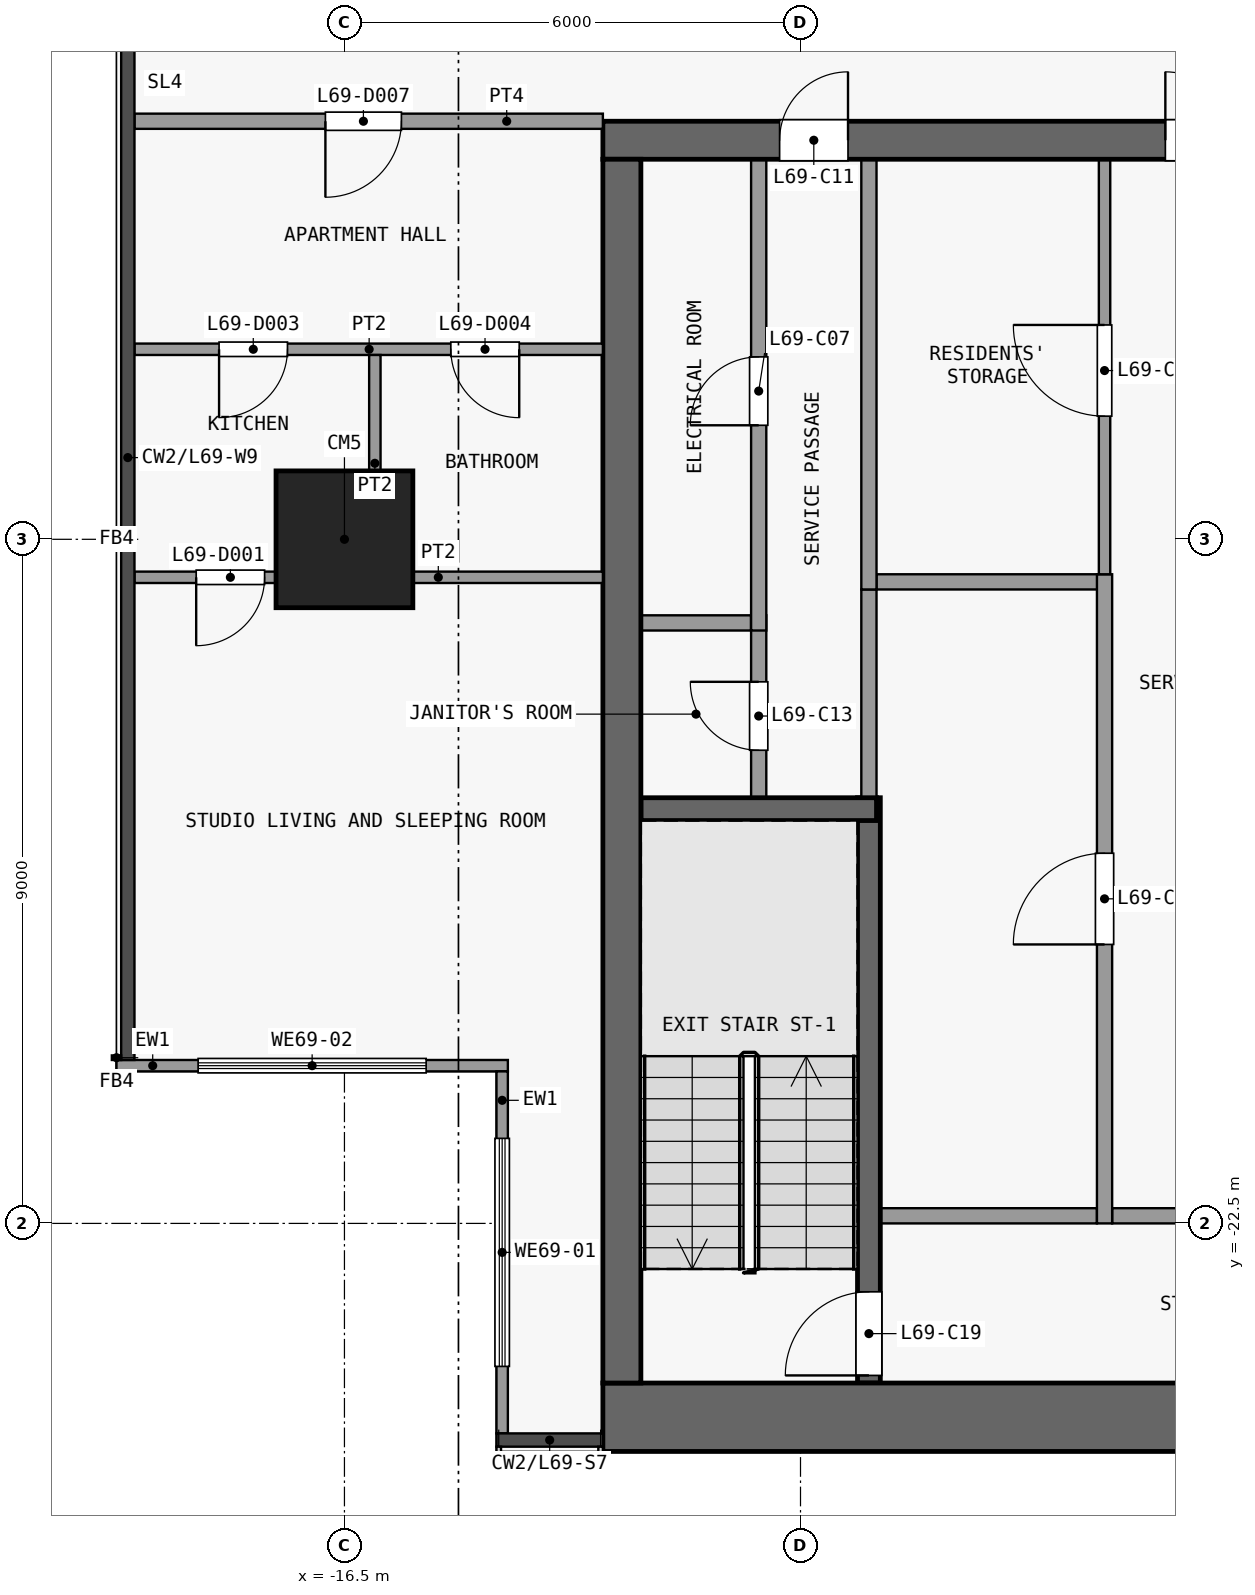
"""IFC4 building model, lengths in metres.
Left out: names, types, materials, properties, quantities, classifications, styles, units other than length and angle.
Written with IfcOpenShell. Run it as: python <this file> out.ifc"""

import sys

from ifc_helpers import new_model, si_unit, direction, frame, frame_2d, origin, origin_2d, place, context, subcontext, project, spatial, rectangle, extrude, element, fill, save


model = new_model("IFC4")
c1 = context("Model", 3, precision=1e-05, world=origin(), true_north=direction((0.0, 1.0)))
c2 = subcontext(c1, "Body", "Model", "MODEL_VIEW")
j1 = project(units=[si_unit("LENGTHUNIT", "METRE"), si_unit("PLANEANGLEUNIT", "RADIAN")], contexts=[c1])
p1 = place(None, origin())
s1 = spatial("IfcSite", under=j1, at=p1, CompositionType="ELEMENT")
p2 = place(p1, origin())
s2 = spatial("IfcBuilding", under=s1, at=p2, CompositionType="ELEMENT")
p3 = place(p2, frame((0.0, 0.0, 273.5)))
s3 = spatial("IfcBuildingStorey", under=s2, at=p3, CompositionType="ELEMENT", Elevation=273.5)
p4 = place(p3, frame((-16.5, -13.5, 0.0), z_axis=(0.0, 0.0, 1.0), x_axis=(1.0, 0.0, 0.0)))
e1 = element("IfcColumn", 1, at=p4, inside=s3, PredefinedType="COLUMN", context=c2, shape_type="SweptSolid", body=[
    extrude(rectangle(XDim=1.8, YDim=1.8, at=origin_2d()), origin(), (0.0, 0.0, 1.0), 3.6),
])
p5 = place(p3, frame((-13.1, -25.05, 0.0), z_axis=(0.0, 0.0, 1.0), x_axis=(1.0, 0.0, 0.0)))
e2 = element("IfcWall", 2, at=p5, inside=s3, PredefinedType="SHEAR", context=c2, shape_type="SweptSolid", body=[
    extrude(rectangle(XDim=26.2, YDim=0.9, at=frame_2d((13.1, 0.0))), origin(), (0.0, 0.0, 1.0), 3.3),
])
p6 = place(p3, frame((-13.1, -8.25, 0.0), z_axis=(0.0, 0.0, 1.0), x_axis=(1.0, 0.0, 0.0)))
e3 = element("IfcWall", 3, at=p6, inside=s3, PredefinedType="SHEAR", context=c2, shape_type="SweptSolid", body=[
    extrude(rectangle(XDim=26.2, YDim=0.5, at=frame_2d((13.1, 0.0))), origin(), (0.0, 0.0, 1.0), 3.3),
])
p7 = place(p6, frame((7.4, 0.0, 0.0)))
e4 = element("IfcOpeningElement", 4, at=p7, cuts=e3, PredefinedType="OPENING", context=c2, shape_type="SweptSolid", body=[
    extrude(rectangle(XDim=1.8, YDim=2.1, at=frame_2d((0.9, 1.05))), frame((0.0, 0.26, 0.0), z_axis=(0.0, -1.0, 0.0), x_axis=(1.0, 0.0, 0.0)), (0.0, 0.0, 1.0), 0.52),
])
p8 = place(p6, frame((17.0, 0.0, 0.0)))
e5 = element("IfcOpeningElement", 5, at=p8, cuts=e3, PredefinedType="OPENING", context=c2, shape_type="SweptSolid", body=[
    extrude(rectangle(XDim=1.8, YDim=2.1, at=frame_2d((0.9, 1.05))), frame((0.0, 0.26, 0.0), z_axis=(0.0, -1.0, 0.0), x_axis=(1.0, 0.0, 0.0)), (0.0, 0.0, 1.0), 0.52),
])
p9 = place(p6, frame((2.325, 0.0, 0.0)))
e6 = element("IfcOpeningElement", 6, at=p9, cuts=e3, PredefinedType="OPENING", context=c2, shape_type="SweptSolid", body=[
    extrude(rectangle(XDim=0.9, YDim=2.1, at=frame_2d((0.45, 1.05))), frame((0.0, 0.26, 0.0), z_axis=(0.0, -1.0, 0.0), x_axis=(1.0, 0.0, 0.0)), (0.0, 0.0, 1.0), 0.52),
])
p10 = place(p6, frame((22.975, 0.0, 0.0)))
e7 = element("IfcOpeningElement", 7, at=p10, cuts=e3, PredefinedType="OPENING", context=c2, shape_type="SweptSolid", body=[
    extrude(rectangle(XDim=0.9, YDim=2.1, at=frame_2d((0.45, 1.05))), frame((0.0, 0.26, 0.0), z_axis=(0.0, -1.0, 0.0), x_axis=(1.0, 0.0, 0.0)), (0.0, 0.0, 1.0), 0.52),
])
p11 = place(p3, frame((-12.85, -24.6, 0.0), z_axis=(0.0, 0.0, 1.0), x_axis=(0.0, 1.0, 0.0)))
e8 = element("IfcWall", 8, at=p11, inside=s3, PredefinedType="SHEAR", context=c2, shape_type="SweptSolid", body=[
    extrude(rectangle(XDim=16.1, YDim=0.5, at=frame_2d((8.05, 0.0))), origin(), (0.0, 0.0, 1.0), 3.3),
])
p12 = place(p3, frame((-9.45, -22.4, 0.0), z_axis=(0.0, 0.0, 1.0), x_axis=(1.0, 0.0, 0.0)))
e9 = element("IfcWall", 9, at=p12, inside=s3, PredefinedType="PARTITIONING", context=c2, shape_type="SweptSolid", body=[
    extrude(rectangle(XDim=2.85, YDim=0.2, at=frame_2d((1.425, 0.0))), origin(), (0.0, 0.0, 1.0), 3.3),
])
p13 = place(p3, frame((-3.25, -22.4, 0.0), z_axis=(0.0, 0.0, 1.0), x_axis=(-1.0, 0.0, 0.0)))
e10 = element("IfcWall", 10, at=p13, inside=s3, PredefinedType="PARTITIONING", context=c2, shape_type="SweptSolid", body=[
    extrude(rectangle(XDim=3.15, YDim=0.2, at=frame_2d((1.575, 0.0))), origin(), (0.0, 0.0, 1.0), 3.3),
])
p14 = place(p13, frame((0.8, 0.0, 0.0)))
e11 = element("IfcOpeningElement", 11, at=p14, cuts=e10, PredefinedType="OPENING", context=c2, shape_type="SweptSolid", body=[
    extrude(rectangle(XDim=1.5, YDim=2.1, at=frame_2d((0.75, 1.05))), frame((0.0, 0.11, 0.0), z_axis=(0.0, -1.0, 0.0), x_axis=(1.0, 0.0, 0.0)), (0.0, 0.0, 1.0), 0.22),
])
p15 = place(p3, frame((-12.6, -17.05, 0.0), z_axis=(0.0, 0.0, 1.0), x_axis=(1.0, 0.0, 0.0)))
e12 = element("IfcWall", 12, at=p15, inside=s3, PredefinedType="SHEAR", context=c2, shape_type="SweptSolid", body=[
    extrude(rectangle(XDim=3.1, YDim=0.3, at=frame_2d((1.55, 0.0))), origin(), (0.0, 0.0, 1.0), 3.3),
])
p16 = place(p3, frame((-12.6, -14.6, 0.0), z_axis=(0.0, 0.0, 1.0), x_axis=(1.0, 0.0, 0.0)))
e13 = element("IfcWall", 13, at=p16, inside=s3, PredefinedType="PARTITIONING", context=c2, shape_type="SweptSolid", body=[
    extrude(rectangle(XDim=1.45, YDim=0.2, at=frame_2d((0.725, 0.0))), origin(), (0.0, 0.0, 1.0), 3.3),
])
p17 = place(p3, frame((-9.5, -14.06, 0.0), z_axis=(0.0, 0.0, 1.0), x_axis=(1.0, 0.0, 0.0)))
e14 = element("IfcWall", 14, at=p17, inside=s3, PredefinedType="PARTITIONING", context=c2, shape_type="SweptSolid", body=[
    extrude(rectangle(XDim=3.075, YDim=0.2, at=frame_2d((1.538, 0.0))), origin(), (0.0, 0.0, 1.0), 3.3),
])
p18 = place(p3, frame((-11.05, -16.9, 0.0), z_axis=(0.0, 0.0, 1.0), x_axis=(0.0, 1.0, 0.0)))
e15 = element("IfcWall", 15, at=p18, inside=s3, PredefinedType="PARTITIONING", context=c2, shape_type="SweptSolid", body=[
    extrude(rectangle(XDim=2.4, YDim=0.2, at=frame_2d((1.2, 0.0))), origin(), (0.0, 0.0, 1.0), 3.3),
])
p19 = place(p18, frame((0.625, 0.0, 0.0)))
e16 = element("IfcOpeningElement", 16, at=p19, cuts=e15, PredefinedType="OPENING", context=c2, shape_type="SweptSolid", body=[
    extrude(rectangle(XDim=0.9, YDim=2.1, at=frame_2d((0.45, 1.05))), frame((0.0, 0.11, 0.0), z_axis=(0.0, -1.0, 0.0), x_axis=(1.0, 0.0, 0.0)), (0.0, 0.0, 1.0), 0.22),
])
p20 = place(p3, frame((-11.05, -14.7, 0.0), z_axis=(0.0, 0.0, 1.0), x_axis=(0.0, 1.0, 0.0)))
e17 = element("IfcWall", 17, at=p20, inside=s3, PredefinedType="PARTITIONING", context=c2, shape_type="SweptSolid", body=[
    extrude(rectangle(XDim=6.2, YDim=0.2, at=frame_2d((3.1, 0.0))), origin(), (0.0, 0.0, 1.0), 3.3),
])
p21 = place(p20, frame((2.7, 0.0, 0.0)))
e18 = element("IfcOpeningElement", 18, at=p21, cuts=e17, PredefinedType="OPENING", context=c2, shape_type="SweptSolid", body=[
    extrude(rectangle(XDim=0.9, YDim=2.1, at=frame_2d((0.45, 1.05))), frame((0.0, 0.11, 0.0), z_axis=(0.0, -1.0, 0.0), x_axis=(1.0, 0.0, 0.0)), (0.0, 0.0, 1.0), 0.22),
])
p22 = place(p3, frame((-9.6, -24.6, 0.0), z_axis=(0.0, 0.0, 1.0), x_axis=(0.0, 1.0, 0.0)))
e19 = element("IfcWall", 19, at=p22, inside=s3, PredefinedType="SHEAR", context=c2, shape_type="SweptSolid", body=[
    extrude(rectangle(XDim=7.7, YDim=0.3, at=frame_2d((3.85, 0.0))), origin(), (0.0, 0.0, 1.0), 3.3),
])
p23 = place(p22, frame((0.1, 0.0, 0.0)))
e20 = element("IfcOpeningElement", 20, at=p23, cuts=e19, PredefinedType="OPENING", context=c2, shape_type="SweptSolid", body=[
    extrude(rectangle(XDim=1.1, YDim=2.1, at=frame_2d((0.55, 1.05))), frame((0.0, 0.16, 0.0), z_axis=(0.0, -1.0, 0.0), x_axis=(1.0, 0.0, 0.0)), (0.0, 0.0, 1.0), 0.32),
])
p24 = place(p3, frame((-9.6, -16.9, 0.0), z_axis=(0.0, 0.0, 1.0), x_axis=(0.0, 1.0, 0.0)))
e21 = element("IfcWall", 21, at=p24, inside=s3, PredefinedType="PARTITIONING", context=c2, shape_type="SweptSolid", body=[
    extrude(rectangle(XDim=2.74, YDim=0.2, at=frame_2d((1.37, 0.0))), origin(), (0.0, 0.0, 1.0), 3.3),
])
p25 = place(p3, frame((-9.6, -14.16, 0.0), z_axis=(0.0, 0.0, 1.0), x_axis=(0.0, 1.0, 0.0)))
e22 = element("IfcWall", 22, at=p25, inside=s3, PredefinedType="PARTITIONING", context=c2, shape_type="SweptSolid", body=[
    extrude(rectangle(XDim=5.66, YDim=0.2, at=frame_2d((2.83, 0.0))), origin(), (0.0, 0.0, 1.0), 3.3),
])
p26 = place(p3, frame((-6.5, -22.5, 0.0), z_axis=(0.0, 0.0, 1.0), x_axis=(0.0, 1.0, 0.0)))
e23 = element("IfcWall", 23, at=p26, inside=s3, PredefinedType="PARTITIONING", context=c2, shape_type="SweptSolid", body=[
    extrude(rectangle(XDim=8.54, YDim=0.2, at=frame_2d((4.27, 0.0))), origin(), (0.0, 0.0, 1.0), 3.3),
])
p27 = place(p26, frame((3.67, 0.0, 0.0)))
e24 = element("IfcOpeningElement", 24, at=p27, cuts=e23, PredefinedType="OPENING", context=c2, shape_type="SweptSolid", body=[
    extrude(rectangle(XDim=1.2, YDim=2.1, at=frame_2d((0.6, 1.05))), frame((0.0, 0.11, 0.0), z_axis=(0.0, -1.0, 0.0), x_axis=(1.0, 0.0, 0.0)), (0.0, 0.0, 1.0), 0.22),
])
p28 = place(p3, frame((-6.5, -13.96, 0.0), z_axis=(0.0, 0.0, 1.0), x_axis=(0.0, 1.0, 0.0)))
e25 = element("IfcWall", 25, at=p28, inside=s3, PredefinedType="PARTITIONING", context=c2, shape_type="SweptSolid", body=[
    extrude(rectangle(XDim=5.46, YDim=0.15, at=frame_2d((2.73, 0.0))), origin(), (0.0, 0.0, 1.0), 3.3),
])
p29 = place(p28, frame((2.08, 0.0, 0.0)))
e26 = element("IfcOpeningElement", 26, at=p29, cuts=e25, PredefinedType="OPENING", context=c2, shape_type="SweptSolid", body=[
    extrude(rectangle(XDim=1.2, YDim=2.1, at=frame_2d((0.6, 1.05))), frame((0.0, 0.085, 0.0), z_axis=(0.0, -1.0, 0.0), x_axis=(1.0, 0.0, 0.0)), (0.0, 0.0, 1.0), 0.17),
])
p30 = place(p3, frame((-14.425, -25.262, 0.0), z_axis=(0.0, 0.0, 1.0), x_axis=(0.0, 1.0, 0.0)))
e27 = element("IfcWall", 27, at=p30, inside=s3, PredefinedType="SOLIDWALL", context=c2, shape_type="SweptSolid", body=[
    extrude(rectangle(XDim=4.762, YDim=0.15, at=frame_2d((2.381, 0.0))), origin(), (0.0, 0.0, 1.0), 3.3),
])
p31 = place(p30, frame((0.881, 0.0, 0.9)))
e28 = element("IfcOpeningElement", 28, at=p31, cuts=e27, PredefinedType="OPENING", context=c2, shape_type="SweptSolid", body=[
    extrude(rectangle(XDim=3.0, YDim=2.4, at=frame_2d((1.5, 1.2))), frame((0.0, 0.085, 0.0), z_axis=(0.0, -1.0, 0.0), x_axis=(1.0, 0.0, 0.0)), (0.0, 0.0, 1.0), 0.17),
])
p32 = place(p3, frame((-14.35, -20.425, 0.0), z_axis=(0.0, 0.0, 1.0), x_axis=(-1.0, 0.0, 0.0)))
e29 = element("IfcWall", 29, at=p32, inside=s3, PredefinedType="SOLIDWALL", context=c2, shape_type="SweptSolid", body=[
    extrude(rectangle(XDim=5.15, YDim=0.15, at=frame_2d((2.575, 0.0))), origin(), (0.0, 0.0, 1.0), 3.3),
])
p33 = place(p32, frame((1.075, 0.0, 0.9)))
e30 = element("IfcOpeningElement", 30, at=p33, cuts=e29, PredefinedType="OPENING", context=c2, shape_type="SweptSolid", body=[
    extrude(rectangle(XDim=3.0, YDim=2.4, at=frame_2d((1.5, 1.2))), frame((0.0, 0.085, 0.0), z_axis=(0.0, -1.0, 0.0), x_axis=(1.0, 0.0, 0.0)), (0.0, 0.0, 1.0), 0.17),
])
p34 = place(p3, frame((-19.262, -14.0, 0.0), z_axis=(0.0, 0.0, 1.0), x_axis=(1.0, 0.0, 0.0)))
e31 = element("IfcWall", 31, at=p34, inside=s3, PredefinedType="PARTITIONING", context=c2, shape_type="SweptSolid", body=[
    extrude(rectangle(XDim=6.162, YDim=0.15, at=frame_2d((3.081, 0.0))), origin(), (0.0, 0.0, 1.0), 3.3),
])
p35 = place(p34, frame((0.812, 0.0, 0.0)))
e32 = element("IfcOpeningElement", 32, at=p35, cuts=e31, PredefinedType="OPENING", context=c2, shape_type="SweptSolid", body=[
    extrude(rectangle(XDim=0.9, YDim=2.1, at=frame_2d((0.45, 1.05))), frame((0.0, 0.085, 0.0), z_axis=(0.0, -1.0, 0.0), x_axis=(1.0, 0.0, 0.0)), (0.0, 0.0, 1.0), 0.17),
])
p36 = place(p3, frame((-19.262, -11.0, 0.0), z_axis=(0.0, 0.0, 1.0), x_axis=(1.0, 0.0, 0.0)))
e33 = element("IfcWall", 33, at=p36, inside=s3, PredefinedType="PARTITIONING", context=c2, shape_type="SweptSolid", body=[
    extrude(rectangle(XDim=6.162, YDim=0.15, at=frame_2d((3.081, 0.0))), origin(), (0.0, 0.0, 1.0), 3.3),
])
p37 = place(p36, frame((1.113, 0.0, 0.0)))
e34 = element("IfcOpeningElement", 34, at=p37, cuts=e33, PredefinedType="OPENING", context=c2, shape_type="SweptSolid", body=[
    extrude(rectangle(XDim=0.9, YDim=2.1, at=frame_2d((0.45, 1.05))), frame((0.0, 0.085, 0.0), z_axis=(0.0, -1.0, 0.0), x_axis=(1.0, 0.0, 0.0)), (0.0, 0.0, 1.0), 0.17),
])
p38 = place(p36, frame((4.162, 0.0, 0.0)))
e35 = element("IfcOpeningElement", 35, at=p38, cuts=e33, PredefinedType="OPENING", context=c2, shape_type="SweptSolid", body=[
    extrude(rectangle(XDim=0.9, YDim=2.1, at=frame_2d((0.45, 1.05))), frame((0.0, 0.085, 0.0), z_axis=(0.0, -1.0, 0.0), x_axis=(1.0, 0.0, 0.0)), (0.0, 0.0, 1.0), 0.17),
])
p39 = place(p3, frame((-19.262, -8.0, 0.0), z_axis=(0.0, 0.0, 1.0), x_axis=(1.0, 0.0, 0.0)))
e36 = element("IfcWall", 36, at=p39, inside=s3, PredefinedType="PARTITIONING", context=c2, shape_type="SweptSolid", body=[
    extrude(rectangle(XDim=6.162, YDim=0.2, at=frame_2d((3.081, 0.0))), origin(), (0.0, 0.0, 1.0), 3.3),
])
p40 = place(p39, frame((2.512, 0.0, 0.0)))
e37 = element("IfcOpeningElement", 37, at=p40, cuts=e36, PredefinedType="OPENING", context=c2, shape_type="SweptSolid", body=[
    extrude(rectangle(XDim=1.0, YDim=2.1, at=frame_2d((0.5, 1.05))), frame((0.0, 0.11, 0.0), z_axis=(0.0, -1.0, 0.0), x_axis=(1.0, 0.0, 0.0)), (0.0, 0.0, 1.0), 0.22),
])
p41 = place(p3, frame((-16.1, -13.925, 0.0), z_axis=(0.0, 0.0, 1.0), x_axis=(0.0, 1.0, 0.0)))
e38 = element("IfcWall", 38, at=p41, inside=s3, PredefinedType="PARTITIONING", context=c2, shape_type="SweptSolid", body=[
    extrude(rectangle(XDim=2.85, YDim=0.15, at=frame_2d((1.425, 0.0))), origin(), (0.0, 0.0, 1.0), 3.3),
])
p42 = place(p7, origin())
e39 = element("IfcDoor", 39, at=p42, inside=s3, OperationType="DOUBLE_DOOR_SINGLE_SWING", PredefinedType="DOOR", context=c2, shape_type="SweptSolid", body=[
    extrude(rectangle(XDim=1.8, YDim=2.1, at=frame_2d((0.9, 1.05))), frame((0.0, 0.025, 0.0), z_axis=(0.0, -1.0, 0.0), x_axis=(1.0, 0.0, 0.0)), (0.0, 0.0, 1.0), 0.05),
])
fill(e4, e39)
p43 = place(p21, origin())
e40 = element("IfcDoor", 40, at=p43, inside=s3, OperationType="SINGLE_SWING_LEFT", PredefinedType="DOOR", context=c2, shape_type="SweptSolid", body=[
    extrude(rectangle(XDim=0.9, YDim=2.1, at=frame_2d((0.45, 1.05))), frame((0.0, 0.025, 0.0), z_axis=(0.0, -1.0, 0.0), x_axis=(1.0, 0.0, 0.0)), (0.0, 0.0, 1.0), 0.05),
])
fill(e18, e40)
p44 = place(p27, origin())
e41 = element("IfcDoor", 41, at=p44, inside=s3, OperationType="SINGLE_SWING_LEFT", PredefinedType="DOOR", context=c2, shape_type="SweptSolid", body=[
    extrude(rectangle(XDim=1.2, YDim=2.1, at=frame_2d((0.6, 1.05))), frame((0.0, 0.025, 0.0), z_axis=(0.0, -1.0, 0.0), x_axis=(1.0, 0.0, 0.0)), (0.0, 0.0, 1.0), 0.05),
])
fill(e24, e41)
p45 = place(p9, origin())
e42 = element("IfcDoor", 42, at=p45, inside=s3, OperationType="SINGLE_SWING_RIGHT", PredefinedType="DOOR", context=c2, shape_type="SweptSolid", body=[
    extrude(rectangle(XDim=0.9, YDim=2.1, at=frame_2d((0.45, 1.05))), frame((0.0, 0.025, 0.0), z_axis=(0.0, -1.0, 0.0), x_axis=(1.0, 0.0, 0.0)), (0.0, 0.0, 1.0), 0.05),
])
fill(e6, e42)
p46 = place(p19, origin())
e43 = element("IfcDoor", 43, at=p46, inside=s3, OperationType="SINGLE_SWING_RIGHT", PredefinedType="DOOR", context=c2, shape_type="SweptSolid", body=[
    extrude(rectangle(XDim=0.9, YDim=2.1, at=frame_2d((0.45, 1.05))), frame((0.0, 0.025, 0.0), z_axis=(0.0, -1.0, 0.0), x_axis=(1.0, 0.0, 0.0)), (0.0, 0.0, 1.0), 0.05),
])
fill(e16, e43)
p47 = place(p29, origin())
e44 = element("IfcDoor", 44, at=p47, inside=s3, OperationType="SINGLE_SWING_RIGHT", PredefinedType="DOOR", context=c2, shape_type="SweptSolid", body=[
    extrude(rectangle(XDim=1.2, YDim=2.1, at=frame_2d((0.6, 1.05))), frame((0.0, 0.025, 0.0), z_axis=(0.0, -1.0, 0.0), x_axis=(1.0, 0.0, 0.0)), (0.0, 0.0, 1.0), 0.05),
])
fill(e26, e44)
p48 = place(p23, origin())
e45 = element("IfcDoor", 45, at=p48, inside=s3, OperationType="SINGLE_SWING_LEFT", PredefinedType="DOOR", context=c2, shape_type="SweptSolid", body=[
    extrude(rectangle(XDim=1.1, YDim=2.1, at=frame_2d((0.55, 1.05))), frame((0.0, 0.025, 0.0), z_axis=(0.0, -1.0, 0.0), x_axis=(1.0, 0.0, 0.0)), (0.0, 0.0, 1.0), 0.05),
])
fill(e20, e45)
p49 = place(p31, origin())
e46 = element("IfcWindow", 46, at=p49, inside=s3, PartitioningType="SINGLE_PANEL", PredefinedType="WINDOW", context=c2, shape_type="SweptSolid", body=[
    extrude(rectangle(XDim=3.0, YDim=2.4, at=frame_2d((1.5, 1.2))), frame((0.0, 0.03, 0.0), z_axis=(0.0, -1.0, 0.0), x_axis=(1.0, 0.0, 0.0)), (0.0, 0.0, 1.0), 0.06),
])
fill(e28, e46)
p50 = place(p33, origin())
e47 = element("IfcWindow", 47, at=p50, inside=s3, PartitioningType="SINGLE_PANEL", PredefinedType="WINDOW", context=c2, shape_type="SweptSolid", body=[
    extrude(rectangle(XDim=3.0, YDim=2.4, at=frame_2d((1.5, 1.2))), frame((0.0, 0.03, 0.0), z_axis=(0.0, -1.0, 0.0), x_axis=(1.0, 0.0, 0.0)), (0.0, 0.0, 1.0), 0.06),
])
fill(e30, e47)
p51 = place(p35, origin())
e48 = element("IfcDoor", 48, at=p51, inside=s3, OperationType="SINGLE_SWING_LEFT", PredefinedType="DOOR", context=c2, shape_type="SweptSolid", body=[
    extrude(rectangle(XDim=0.9, YDim=2.1, at=frame_2d((0.45, 1.05))), frame((0.0, 0.025, 0.0), z_axis=(0.0, -1.0, 0.0), x_axis=(1.0, 0.0, 0.0)), (0.0, 0.0, 1.0), 0.05),
])
fill(e32, e48)
p52 = place(p37, origin())
e49 = element("IfcDoor", 49, at=p52, inside=s3, OperationType="SINGLE_SWING_LEFT", PredefinedType="DOOR", context=c2, shape_type="SweptSolid", body=[
    extrude(rectangle(XDim=0.9, YDim=2.1, at=frame_2d((0.45, 1.05))), frame((0.0, 0.025, 0.0), z_axis=(0.0, -1.0, 0.0), x_axis=(1.0, 0.0, 0.0)), (0.0, 0.0, 1.0), 0.05),
])
fill(e34, e49)
p53 = place(p38, origin())
e50 = element("IfcDoor", 50, at=p53, inside=s3, OperationType="SINGLE_SWING_RIGHT", PredefinedType="DOOR", context=c2, shape_type="SweptSolid", body=[
    extrude(rectangle(XDim=0.9, YDim=2.1, at=frame_2d((0.45, 1.05))), frame((0.0, 0.025, 0.0), z_axis=(0.0, -1.0, 0.0), x_axis=(1.0, 0.0, 0.0)), (0.0, 0.0, 1.0), 0.05),
])
fill(e35, e50)
p54 = place(p40, origin())
e51 = element("IfcDoor", 51, at=p54, inside=s3, OperationType="SINGLE_SWING_LEFT", PredefinedType="DOOR", context=c2, shape_type="SweptSolid", body=[
    extrude(rectangle(XDim=1.0, YDim=2.1, at=frame_2d((0.5, 1.05))), frame((0.0, 0.025, 0.0), z_axis=(0.0, -1.0, 0.0), x_axis=(1.0, 0.0, 0.0)), (0.0, 0.0, 1.0), 0.05),
])
fill(e37, e51)
save(model, sys.argv[1])
